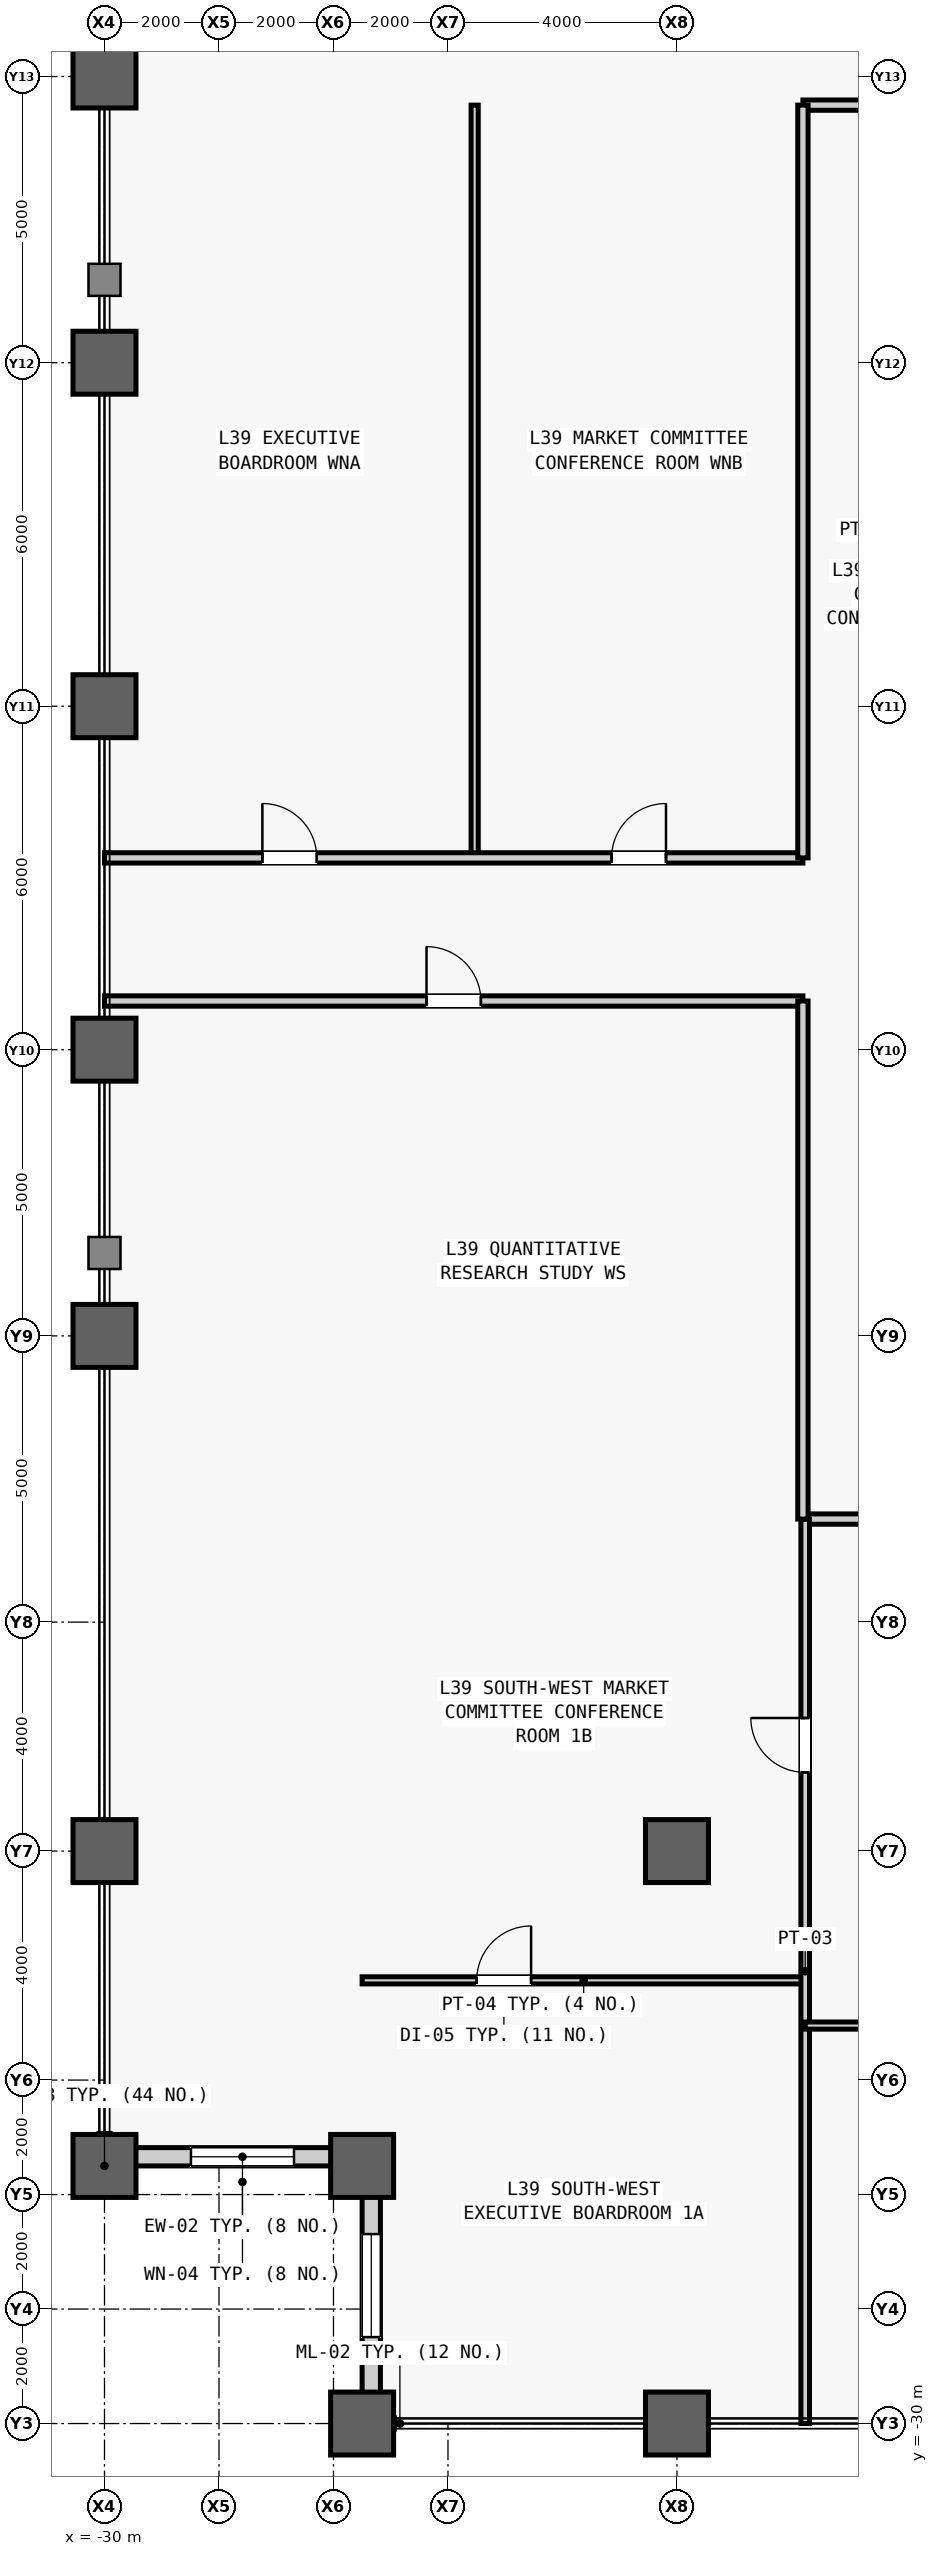
"""IFC4 building model, lengths in metres.
Left out: names, types, materials, properties, quantities, classifications, styles, units other than length and angle.
Written with IfcOpenShell. Run it as: python <this file> out.ifc"""

import sys

from ifc_helpers import new_model, si_unit, direction, frame, frame_2d, origin, origin_2d, place, context, subcontext, project, spatial, rectangle, hollow_rectangle, extrude, source, transform, mapped, element, fill, save


model = new_model("IFC4")
c1 = context("Model", 3, precision=1e-05, world=origin(), true_north=direction((0.0, 1.0)))
c2 = subcontext(c1, "Body", "Model", "MODEL_VIEW")
j1 = project(units=[si_unit("LENGTHUNIT", "METRE"), si_unit("PLANEANGLEUNIT", "RADIAN")], contexts=[c1])
p1 = place(None, origin())
s1 = spatial("IfcSite", under=j1, at=p1, CompositionType="ELEMENT")
p2 = place(p1, origin())
s2 = spatial("IfcBuilding", under=s1, at=p2, CompositionType="ELEMENT")
p3 = place(p2, frame((0.0, 0.0, 171.1)))
s3 = spatial("IfcBuildingStorey", under=s2, at=p3, CompositionType="ELEMENT", Elevation=171.1)
m1 = source(origin(), c2, "Body", "SweptSolid", [
    extrude(hollow_rectangle(XDim=1.1, YDim=1.1, WallThickness=0.06, at=origin_2d()), origin(), (0.0, 0.0, 1.0), 4.0),
])
for number, where, z_axis, x_axis in (
    (1, (-30.0, -25.5, 0.0), (0.0, 0.0, 1.0), (1.0, 0.0, 0.0)),
    (2, (-30.0, -20.0, 0.0), (0.0, 0.0, 1.0), (1.0, 0.0, 0.0)),
    (3, (-30.0, -11.0, 0.0), (0.0, 0.0, 1.0), (1.0, 0.0, 0.0)),
    (4, (-30.0, -6.0, 0.0), (0.0, 0.0, 1.0), (1.0, 0.0, 0.0)),
    (5, (-30.0, 0.0, 0.0), (0.0, 0.0, 1.0), (1.0, 0.0, 0.0)),
    (6, (-30.0, 6.0, 0.0), (0.0, 0.0, 1.0), (1.0, 0.0, 0.0)),
    (7, (-30.0, 11.0, 0.0), (0.0, 0.0, 1.0), (1.0, 0.0, 0.0)),
    (8, (-25.5, -30.0, 0.0), (0.0, 0.0, 1.0), (1.0, 0.0, 0.0)),
    (9, (-25.5, -25.5, 0.0), (0.0, 0.0, 1.0), (1.0, 0.0, 0.0)),
    (10, (-20.0, -30.0, 0.0), (0.0, 0.0, 1.0), (1.0, 0.0, 0.0)),
    (11, (-20.0, -20.0, 0.0), (0.0, 0.0, 1.0), (1.0, 0.0, 0.0)),
):
    element("IfcColumn", number, at=place(p3, frame(where, z_axis=z_axis, x_axis=x_axis)), inside=s3, PredefinedType="COLUMN", context=c2, shape_type="MappedRepresentation", body=[
        mapped(m1, transform((0.0, 0.0, 0.0), scale=1.0)),
    ])
m2 = source(origin(), c2, "Body", "SweptSolid", [
    extrude(rectangle(XDim=4.18, YDim=0.32, at=frame_2d((2.09, 0.0))), origin(), (0.0, 0.0, 1.0), 3.164),
])
p4 = place(p3, frame((-25.5, -25.34, 0.0), z_axis=(0.0, 0.0, 1.0), x_axis=(-1.0, 0.0, 0.0)))
e12 = element("IfcWall", 12, at=p4, inside=s3, PredefinedType="STANDARD", context=c2, shape_type="MappedRepresentation", body=[
    mapped(m2, transform((0.0, 0.0, 0.0), scale=1.0)),
])
m3 = source(origin(), c2, "Body", "SweptSolid", [
    extrude(rectangle(XDim=1.8, YDim=2.4, at=frame_2d((0.9, 1.2))), frame((0.0, 0.17, 0.0), z_axis=(0.0, -1.0, 0.0), x_axis=(1.0, 0.0, 0.0)), (0.0, 0.0, 1.0), 0.34),
])
p5 = place(p4, frame((1.19, 0.0, 0.5)))
e13 = element("IfcOpeningElement", 13, at=p5, cuts=e12, PredefinedType="OPENING", context=c2, shape_type="MappedRepresentation", body=[
    mapped(m3, transform((0.0, 0.0, 0.0), scale=1.0)),
])
p6 = place(p3, frame((-25.34, -29.68, 0.0), z_axis=(0.0, 0.0, 1.0), x_axis=(0.0, 1.0, 0.0)))
e14 = element("IfcWall", 14, at=p6, inside=s3, PredefinedType="STANDARD", context=c2, shape_type="MappedRepresentation", body=[
    mapped(m2, transform((0.0, 0.0, 0.0), scale=1.0)),
])
p7 = place(p6, frame((1.19, 0.0, 0.5)))
e15 = element("IfcOpeningElement", 15, at=p7, cuts=e14, PredefinedType="OPENING", context=c2, shape_type="MappedRepresentation", body=[
    mapped(m3, transform((0.0, 0.0, 0.0), scale=1.0)),
])
m4 = source(origin(), c2, "Body", "SweptSolid", [
    extrude(rectangle(XDim=2.45, YDim=0.18, at=frame_2d((1.225, 0.0))), origin(), (0.0, 0.0, 1.0), 3.78),
])
for number, where, z_axis, x_axis in (
    (16, (-17.8, 10.5, 0.0), (0.0, 0.0, 1.0), (1.0, 0.0, 0.0)),
    (17, (-17.8, -14.2, 0.0), (0.0, 0.0, 1.0), (1.0, 0.0, 0.0)),
):
    element("IfcWall", number, at=place(p3, frame(where, z_axis=z_axis, x_axis=x_axis)), inside=s3, PredefinedType="PARTITIONING", context=c2, shape_type="MappedRepresentation", body=[
        mapped(m4, transform((0.0, 0.0, 0.0), scale=1.0)),
    ])
m5 = source(origin(), c2, "Body", "SweptSolid", [
    extrude(rectangle(XDim=7.74, YDim=0.125, at=frame_2d((3.87, 0.0))), origin(), (0.0, 0.0, 1.0), 3.78),
])
p8 = place(p3, frame((-25.5, -22.258, 0.0), z_axis=(0.0, 0.0, 1.0), x_axis=(1.0, 0.0, 0.0)))
e18 = element("IfcWall", 18, at=p8, inside=s3, PredefinedType="PARTITIONING", context=c2, shape_type="MappedRepresentation", body=[
    mapped(m5, transform((0.0, 0.0, 0.0), scale=1.0)),
])
m6 = source(origin(), c2, "Body", "SweptSolid", [
    extrude(rectangle(XDim=0.95, YDim=2.15, at=frame_2d((0.475, 1.075))), frame((0.0, 0.073, 0.0), z_axis=(0.0, -1.0, 0.0), x_axis=(1.0, 0.0, 0.0)), (0.0, 0.0, 1.0), 0.145),
])
p9 = place(p8, frame((2.002, 0.0, 0.0)))
e19 = element("IfcOpeningElement", 19, at=p9, cuts=e18, PredefinedType="OPENING", context=c2, shape_type="MappedRepresentation", body=[
    mapped(m6, transform((0.0, 0.0, 0.0), scale=1.0)),
])
m7 = source(origin(), c2, "Body", "SweptSolid", [
    extrude(rectangle(XDim=15.8, YDim=0.15, at=frame_2d((7.9, 0.0))), origin(), (0.0, 0.0, 1.0), 3.78),
])
p10 = place(p3, frame((-17.76, -30.0, 0.0), z_axis=(0.0, 0.0, 1.0), x_axis=(0.0, 1.0, 0.0)))
e20 = element("IfcWall", 20, at=p10, inside=s3, PredefinedType="PARTITIONING", context=c2, shape_type="MappedRepresentation", body=[
    mapped(m7, transform((0.0, 0.0, 0.0), scale=1.0)),
])
m8 = source(origin(), c2, "Body", "SweptSolid", [
    extrude(rectangle(XDim=0.95, YDim=2.15, at=frame_2d((0.475, 1.075))), frame((0.0, 0.085, 0.0), z_axis=(0.0, -1.0, 0.0), x_axis=(1.0, 0.0, 0.0)), (0.0, 0.0, 1.0), 0.17),
])
p11 = place(p10, frame((11.375, 0.0, 0.0)))
e21 = element("IfcOpeningElement", 21, at=p11, cuts=e20, PredefinedType="OPENING", context=c2, shape_type="MappedRepresentation", body=[
    mapped(m8, transform((0.0, 0.0, 0.0), scale=1.0)),
])
p12 = place(p3, frame((-17.76, -23.048, 0.0), z_axis=(0.0, 0.0, 1.0), x_axis=(1.0, 0.0, 0.0)))
e22 = element("IfcWall", 22, at=p12, inside=s3, PredefinedType="PARTITIONING", context=c2, shape_type="MappedRepresentation", body=[
    mapped(m5, transform((0.0, 0.0, 0.0), scale=1.0)),
])
p13 = place(p12, frame((6.415, 0.0, 0.0)))
e23 = element("IfcOpeningElement", 23, at=p13, cuts=e22, PredefinedType="OPENING", context=c2, shape_type="MappedRepresentation", body=[
    mapped(m6, transform((0.0, 0.0, 0.0), scale=1.0)),
])
m9 = source(origin(), c2, "Body", "SweptSolid", [
    extrude(rectangle(XDim=12.2, YDim=0.18, at=frame_2d((6.1, 0.0))), origin(), (0.0, 0.0, 1.0), 3.78),
])
p14 = place(p3, frame((-30.0, -5.15, 0.0), z_axis=(0.0, 0.0, 1.0), x_axis=(1.0, 0.0, 0.0)))
e24 = element("IfcWall", 24, at=p14, inside=s3, PredefinedType="PARTITIONING", context=c2, shape_type="MappedRepresentation", body=[
    mapped(m9, transform((0.0, 0.0, 0.0), scale=1.0)),
])
m10 = source(origin(), c2, "Body", "SweptSolid", [
    extrude(rectangle(XDim=0.95, YDim=2.15, at=frame_2d((0.475, 1.075))), frame((0.0, 0.1, 0.0), z_axis=(0.0, -1.0, 0.0), x_axis=(1.0, 0.0, 0.0)), (0.0, 0.0, 1.0), 0.2),
])
p15 = place(p14, frame((5.625, 0.0, 0.0)))
e25 = element("IfcOpeningElement", 25, at=p15, cuts=e24, PredefinedType="OPENING", context=c2, shape_type="MappedRepresentation", body=[
    mapped(m10, transform((0.0, 0.0, 0.0), scale=1.0)),
])
m11 = source(origin(), c2, "Body", "SweptSolid", [
    extrude(rectangle(XDim=9.05, YDim=0.18, at=frame_2d((4.525, 0.0))), origin(), (0.0, 0.0, 1.0), 3.78),
])
p16 = place(p3, frame((-17.8, -14.2, 0.0), z_axis=(0.0, 0.0, 1.0), x_axis=(0.0, 1.0, 0.0)))
e26 = element("IfcWall", 26, at=p16, inside=s3, PredefinedType="PARTITIONING", context=c2, shape_type="MappedRepresentation", body=[
    mapped(m11, transform((0.0, 0.0, 0.0), scale=1.0)),
])
m12 = source(origin(), c2, "Body", "SweptSolid", [
    extrude(rectangle(XDim=13.15, YDim=0.125, at=frame_2d((6.575, 0.0))), origin(), (0.0, 0.0, 1.0), 3.78),
])
p17 = place(p3, frame((-23.534, -2.65, 0.0), z_axis=(0.0, 0.0, 1.0), x_axis=(0.0, 1.0, 0.0)))
e27 = element("IfcWall", 27, at=p17, inside=s3, PredefinedType="PARTITIONING", context=c2, shape_type="MappedRepresentation", body=[
    mapped(m12, transform((0.0, 0.0, 0.0), scale=1.0)),
])
p18 = place(p3, frame((-30.0, -2.65, 0.0), z_axis=(0.0, 0.0, 1.0), x_axis=(1.0, 0.0, 0.0)))
e28 = element("IfcWall", 28, at=p18, inside=s3, PredefinedType="PARTITIONING", context=c2, shape_type="MappedRepresentation", body=[
    mapped(m9, transform((0.0, 0.0, 0.0), scale=1.0)),
])
p19 = place(p18, frame((2.758, 0.0, 0.0)))
e29 = element("IfcOpeningElement", 29, at=p19, cuts=e28, PredefinedType="OPENING", context=c2, shape_type="MappedRepresentation", body=[
    mapped(m10, transform((0.0, 0.0, 0.0), scale=1.0)),
])
p20 = place(p18, frame((8.858, 0.0, 0.0)))
e30 = element("IfcOpeningElement", 30, at=p20, cuts=e28, PredefinedType="OPENING", context=c2, shape_type="MappedRepresentation", body=[
    mapped(m10, transform((0.0, 0.0, 0.0), scale=1.0)),
])
m13 = source(origin(), c2, "Body", "SweptSolid", [
    extrude(rectangle(XDim=13.15, YDim=0.18, at=frame_2d((6.575, 0.0))), origin(), (0.0, 0.0, 1.0), 3.78),
])
p21 = place(p3, frame((-17.8, -2.65, 0.0), z_axis=(0.0, 0.0, 1.0), x_axis=(0.0, 1.0, 0.0)))
e31 = element("IfcWall", 31, at=p21, inside=s3, PredefinedType="PARTITIONING", context=c2, shape_type="MappedRepresentation", body=[
    mapped(m13, transform((0.0, 0.0, 0.0), scale=1.0)),
])
m14 = source(origin(), c2, "Body", "SweptSolid", [
    extrude(rectangle(XDim=1.8, YDim=2.4, at=frame_2d((0.9, 1.2))), frame((0.0, 0.03, 0.0), z_axis=(0.0, -1.0, 0.0), x_axis=(1.0, 0.0, 0.0)), (0.0, 0.0, 1.0), 0.06),
])
p22 = place(p5, origin())
e32 = element("IfcWindow", 32, at=p22, inside=s3, PartitioningType="SINGLE_PANEL", PredefinedType="WINDOW", context=c2, shape_type="MappedRepresentation", body=[
    mapped(m14, transform((0.0, 0.0, 0.0), scale=1.0)),
])
fill(e13, e32)
p23 = place(p7, origin())
e33 = element("IfcWindow", 33, at=p23, inside=s3, PartitioningType="SINGLE_PANEL", PredefinedType="WINDOW", context=c2, shape_type="MappedRepresentation", body=[
    mapped(m14, transform((0.0, 0.0, 0.0), scale=1.0)),
])
fill(e15, e33)
m15 = source(origin(), c2, "Body", "SweptSolid", [
    extrude(rectangle(XDim=0.95, YDim=2.15, at=frame_2d((0.475, 1.075))), frame((0.0, 0.025, 0.0), z_axis=(0.0, -1.0, 0.0), x_axis=(1.0, 0.0, 0.0)), (0.0, 0.0, 1.0), 0.05),
])
p24 = place(p9, origin())
e34 = element("IfcDoor", 34, at=p24, inside=s3, OperationType="SINGLE_SWING_RIGHT", PredefinedType="DOOR", context=c2, shape_type="MappedRepresentation", body=[
    mapped(m15, transform((0.0, 0.0, 0.0), scale=1.0)),
])
fill(e19, e34)
p25 = place(p11, origin())
e35 = element("IfcDoor", 35, at=p25, inside=s3, OperationType="SINGLE_SWING_RIGHT", PredefinedType="DOOR", context=c2, shape_type="MappedRepresentation", body=[
    mapped(m15, transform((0.0, 0.0, 0.0), scale=1.0)),
])
fill(e21, e35)
p26 = place(p15, origin())
e36 = element("IfcDoor", 36, at=p26, inside=s3, OperationType="SINGLE_SWING_LEFT", PredefinedType="DOOR", context=c2, shape_type="MappedRepresentation", body=[
    mapped(m15, transform((0.0, 0.0, 0.0), scale=1.0)),
])
fill(e25, e36)
p27 = place(p19, origin())
e37 = element("IfcDoor", 37, at=p27, inside=s3, OperationType="SINGLE_SWING_LEFT", PredefinedType="DOOR", context=c2, shape_type="MappedRepresentation", body=[
    mapped(m15, transform((0.0, 0.0, 0.0), scale=1.0)),
])
fill(e29, e37)
p28 = place(p20, origin())
e38 = element("IfcDoor", 38, at=p28, inside=s3, OperationType="SINGLE_SWING_RIGHT", PredefinedType="DOOR", context=c2, shape_type="MappedRepresentation", body=[
    mapped(m15, transform((0.0, 0.0, 0.0), scale=1.0)),
])
fill(e30, e38)
save(model, sys.argv[1])
